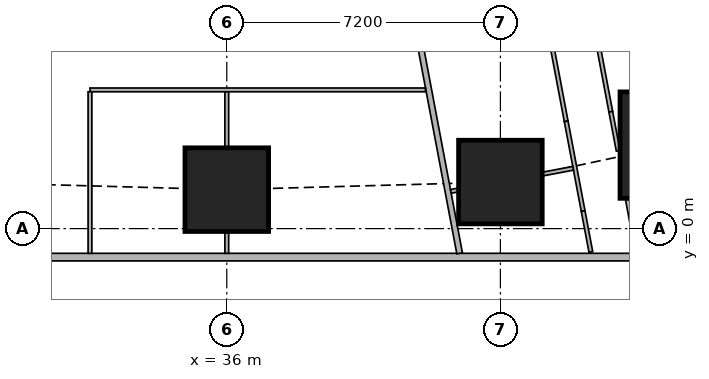
"""IFC4 building model, lengths in metres.
Left out: names, types, materials, properties, quantities, classifications, styles, units other than length and angle.
Written with IfcOpenShell. Run it as: python <this file> out.ifc"""

import sys

from ifc_helpers import new_model, si_unit, direction, frame, frame_2d, origin, origin_2d, place, context, subcontext, project, spatial, rectangle, extrude, element, fill, save


model = new_model("IFC4")
c1 = context("Model", 3, precision=1e-05, world=origin(), true_north=direction((0.0, 1.0)))
c2 = subcontext(c1, "Body", "Model", "MODEL_VIEW")
j1 = project(units=[si_unit("LENGTHUNIT", "METRE"), si_unit("PLANEANGLEUNIT", "RADIAN")], contexts=[c1])
p1 = place(None, origin())
s1 = spatial("IfcSite", under=j1, at=p1, CompositionType="ELEMENT")
p2 = place(p1, origin())
s2 = spatial("IfcBuilding", under=s1, at=p2, CompositionType="ELEMENT")
p3 = place(p2, frame((0.0, 0.0, 81.65)))
s3 = spatial("IfcBuildingStorey", under=s2, at=p3, CompositionType="ELEMENT", Elevation=81.65)
for number, where, z_axis, x_axis in (
    (1, (36.0, 1.025, 0.0), (0.0, 0.0, 1.0), (1.0, 0.0, 0.0)),
    (2, (43.2, 1.225, 0.0), (0.0, 0.0, 1.0), (1.0, 0.0, 0.0)),
):
    element("IfcColumn", number, at=place(p3, frame(where, z_axis=z_axis, x_axis=x_axis)), inside=s3, PredefinedType="COLUMN", context=c2, shape_type="SweptSolid", body=[
        extrude(rectangle(XDim=2.2, YDim=2.2, at=origin_2d()), origin(), (0.0, 0.0, 1.0), 3.75),
    ])
p4 = place(p3, frame((47.748, 2.197, 0.0), z_axis=(0.0, 0.0, 1.0), x_axis=(1.0, 0.0, 0.0)))
e3 = element("IfcColumn", 3, at=p4, inside=s3, PredefinedType="COLUMN", context=c2, shape_type="SweptSolid", body=[
    extrude(rectangle(XDim=2.8, YDim=2.8, at=origin_2d()), origin(), (0.0, 0.0, 1.0), 3.75),
])
p5 = place(p3, frame((2.163, -0.75, 0.0), z_axis=(0.0, 0.0, 1.0), x_axis=(1.0, 0.0, 0.0)))
e4 = element("IfcWall", 4, at=p5, inside=s3, PredefinedType="SOLIDWALL", context=c2, shape_type="SweptSolid", body=[
    extrude(rectangle(XDim=45.628, YDim=0.2, at=frame_2d((22.814, 0.0))), origin(), (0.0, 0.0, 1.0), 3.5),
])
p6 = place(p5, frame((9.537, 0.0, 0.9)))
e5 = element("IfcOpeningElement", 5, at=p6, cuts=e4, PredefinedType="OPENING", context=c2, shape_type="SweptSolid", body=[
    extrude(rectangle(XDim=1.8, YDim=1.5, at=frame_2d((0.9, 0.75))), frame((0.0, 0.11, 0.0), z_axis=(0.0, -1.0, 0.0), x_axis=(1.0, 0.0, 0.0)), (0.0, 0.0, 1.0), 0.22),
])
p7 = place(p5, frame((13.137, 0.0, 0.9)))
e6 = element("IfcOpeningElement", 6, at=p7, cuts=e4, PredefinedType="OPENING", context=c2, shape_type="SweptSolid", body=[
    extrude(rectangle(XDim=1.8, YDim=1.5, at=frame_2d((0.9, 0.75))), frame((0.0, 0.11, 0.0), z_axis=(0.0, -1.0, 0.0), x_axis=(1.0, 0.0, 0.0)), (0.0, 0.0, 1.0), 0.22),
])
p8 = place(p5, frame((16.737, 0.0, 0.9)))
e7 = element("IfcOpeningElement", 7, at=p8, cuts=e4, PredefinedType="OPENING", context=c2, shape_type="SweptSolid", body=[
    extrude(rectangle(XDim=1.8, YDim=1.5, at=frame_2d((0.9, 0.75))), frame((0.0, 0.11, 0.0), z_axis=(0.0, -1.0, 0.0), x_axis=(1.0, 0.0, 0.0)), (0.0, 0.0, 1.0), 0.22),
])
p9 = place(p5, frame((20.337, 0.0, 0.9)))
e8 = element("IfcOpeningElement", 8, at=p9, cuts=e4, PredefinedType="OPENING", context=c2, shape_type="SweptSolid", body=[
    extrude(rectangle(XDim=1.8, YDim=1.5, at=frame_2d((0.9, 0.75))), frame((0.0, 0.11, 0.0), z_axis=(0.0, -1.0, 0.0), x_axis=(1.0, 0.0, 0.0)), (0.0, 0.0, 1.0), 0.22),
])
p10 = place(p5, frame((23.937, 0.0, 0.9)))
e9 = element("IfcOpeningElement", 9, at=p10, cuts=e4, PredefinedType="OPENING", context=c2, shape_type="SweptSolid", body=[
    extrude(rectangle(XDim=1.8, YDim=1.5, at=frame_2d((0.9, 0.75))), frame((0.0, 0.11, 0.0), z_axis=(0.0, -1.0, 0.0), x_axis=(1.0, 0.0, 0.0)), (0.0, 0.0, 1.0), 0.22),
])
p11 = place(p5, frame((27.537, 0.0, 0.9)))
e10 = element("IfcOpeningElement", 10, at=p11, cuts=e4, PredefinedType="OPENING", context=c2, shape_type="SweptSolid", body=[
    extrude(rectangle(XDim=1.8, YDim=1.5, at=frame_2d((0.9, 0.75))), frame((0.0, 0.11, 0.0), z_axis=(0.0, -1.0, 0.0), x_axis=(1.0, 0.0, 0.0)), (0.0, 0.0, 1.0), 0.22),
])
p12 = place(p5, frame((31.137, 0.0, 0.9)))
e11 = element("IfcOpeningElement", 11, at=p12, cuts=e4, PredefinedType="OPENING", context=c2, shape_type="SweptSolid", body=[
    extrude(rectangle(XDim=1.8, YDim=1.5, at=frame_2d((0.9, 0.75))), frame((0.0, 0.11, 0.0), z_axis=(0.0, -1.0, 0.0), x_axis=(1.0, 0.0, 0.0)), (0.0, 0.0, 1.0), 0.22),
])
p13 = place(p5, frame((34.737, 0.0, 0.9)))
e12 = element("IfcOpeningElement", 12, at=p13, cuts=e4, PredefinedType="OPENING", context=c2, shape_type="SweptSolid", body=[
    extrude(rectangle(XDim=1.8, YDim=1.5, at=frame_2d((0.9, 0.75))), frame((0.0, 0.11, 0.0), z_axis=(0.0, -1.0, 0.0), x_axis=(1.0, 0.0, 0.0)), (0.0, 0.0, 1.0), 0.22),
])
p14 = place(p3, frame((50.653, 2.703, 0.0), z_axis=(0.0, 0.0, 1.0), x_axis=(-0.185612026696, 0.982623109613, 0.0)))
e13 = element("IfcWall", 13, at=p14, inside=s3, PredefinedType="SOLIDWALL", context=c2, shape_type="SweptSolid", body=[
    extrude(rectangle(XDim=41.393, YDim=0.2, at=frame_2d((20.697, 0.0))), origin(), (0.0, 0.0, 1.0), 3.5),
])
p15 = place(p14, frame((1.633, 0.0, 0.9)))
e14 = element("IfcOpeningElement", 14, at=p15, cuts=e13, PredefinedType="OPENING", context=c2, shape_type="SweptSolid", body=[
    extrude(rectangle(XDim=1.8, YDim=1.5, at=frame_2d((0.9, 0.75))), frame((0.0, 0.11, 0.0), z_axis=(0.0, -1.0, 0.0), x_axis=(1.0, 0.0, 0.0)), (0.0, 0.0, 1.0), 0.22),
])
p16 = place(p14, frame((6.032, 0.0, 0.9)))
e15 = element("IfcOpeningElement", 15, at=p16, cuts=e13, PredefinedType="OPENING", context=c2, shape_type="SweptSolid", body=[
    extrude(rectangle(XDim=1.8, YDim=1.5, at=frame_2d((0.9, 0.75))), frame((0.0, 0.11, 0.0), z_axis=(0.0, -1.0, 0.0), x_axis=(1.0, 0.0, 0.0)), (0.0, 0.0, 1.0), 0.22),
])
p17 = place(p14, frame((9.848, 0.0, 0.9)))
e16 = element("IfcOpeningElement", 16, at=p17, cuts=e13, PredefinedType="OPENING", context=c2, shape_type="SweptSolid", body=[
    extrude(rectangle(XDim=1.8, YDim=1.5, at=frame_2d((0.9, 0.75))), frame((0.0, 0.11, 0.0), z_axis=(0.0, -1.0, 0.0), x_axis=(1.0, 0.0, 0.0)), (0.0, 0.0, 1.0), 0.22),
])
p18 = place(p14, frame((13.664, 0.0, 0.9)))
e17 = element("IfcOpeningElement", 17, at=p18, cuts=e13, PredefinedType="OPENING", context=c2, shape_type="SweptSolid", body=[
    extrude(rectangle(XDim=1.8, YDim=1.5, at=frame_2d((0.9, 0.75))), frame((0.0, 0.11, 0.0), z_axis=(0.0, -1.0, 0.0), x_axis=(1.0, 0.0, 0.0)), (0.0, 0.0, 1.0), 0.22),
])
p19 = place(p14, frame((17.481, 0.0, 0.9)))
e18 = element("IfcOpeningElement", 18, at=p19, cuts=e13, PredefinedType="OPENING", context=c2, shape_type="SweptSolid", body=[
    extrude(rectangle(XDim=1.8, YDim=1.5, at=frame_2d((0.9, 0.75))), frame((0.0, 0.11, 0.0), z_axis=(0.0, -1.0, 0.0), x_axis=(1.0, 0.0, 0.0)), (0.0, 0.0, 1.0), 0.22),
])
p20 = place(p14, frame((21.297, 0.0, 0.9)))
e19 = element("IfcOpeningElement", 19, at=p20, cuts=e13, PredefinedType="OPENING", context=c2, shape_type="SweptSolid", body=[
    extrude(rectangle(XDim=1.8, YDim=1.5, at=frame_2d((0.9, 0.75))), frame((0.0, 0.11, 0.0), z_axis=(0.0, -1.0, 0.0), x_axis=(1.0, 0.0, 0.0)), (0.0, 0.0, 1.0), 0.22),
])
p21 = place(p14, frame((25.113, 0.0, 0.9)))
e20 = element("IfcOpeningElement", 20, at=p21, cuts=e13, PredefinedType="OPENING", context=c2, shape_type="SweptSolid", body=[
    extrude(rectangle(XDim=1.8, YDim=1.5, at=frame_2d((0.9, 0.75))), frame((0.0, 0.11, 0.0), z_axis=(0.0, -1.0, 0.0), x_axis=(1.0, 0.0, 0.0)), (0.0, 0.0, 1.0), 0.22),
])
p22 = place(p14, frame((28.93, 0.0, 0.9)))
e21 = element("IfcOpeningElement", 21, at=p22, cuts=e13, PredefinedType="OPENING", context=c2, shape_type="SweptSolid", body=[
    extrude(rectangle(XDim=1.8, YDim=1.5, at=frame_2d((0.9, 0.75))), frame((0.0, 0.11, 0.0), z_axis=(0.0, -1.0, 0.0), x_axis=(1.0, 0.0, 0.0)), (0.0, 0.0, 1.0), 0.22),
])
p23 = place(p14, frame((32.746, 0.0, 0.9)))
e22 = element("IfcOpeningElement", 22, at=p23, cuts=e13, PredefinedType="OPENING", context=c2, shape_type="SweptSolid", body=[
    extrude(rectangle(XDim=1.8, YDim=1.5, at=frame_2d((0.9, 0.75))), frame((0.0, 0.11, 0.0), z_axis=(0.0, -1.0, 0.0), x_axis=(1.0, 0.0, 0.0)), (0.0, 0.0, 1.0), 0.22),
])
p24 = place(p14, frame((36.481, 0.0, 0.9)))
e23 = element("IfcOpeningElement", 23, at=p24, cuts=e13, PredefinedType="OPENING", context=c2, shape_type="SweptSolid", body=[
    extrude(rectangle(XDim=1.8, YDim=1.5, at=frame_2d((0.9, 0.75))), frame((0.0, 0.11, 0.0), z_axis=(0.0, -1.0, 0.0), x_axis=(1.0, 0.0, 0.0)), (0.0, 0.0, 1.0), 0.22),
])
p25 = place(p3, frame((33.382, 45.65, 0.0), z_axis=(0.0, 0.0, 1.0), x_axis=(0.185593544777, -0.982626600565, 0.0)))
e24 = element("IfcWall", 24, at=p25, inside=s3, PredefinedType="SOLIDWALL", context=c2, shape_type="SweptSolid", body=[
    extrude(rectangle(XDim=47.118, YDim=0.15, at=frame_2d((23.559, 0.0))), origin(), (0.0, 0.0, 1.0), 2.2),
])
p26 = place(p25, frame((19.054, 0.0, 0.0)))
e25 = element("IfcOpeningElement", 25, at=p26, cuts=e24, PredefinedType="OPENING", context=c2, shape_type="SweptSolid", body=[
    extrude(rectangle(XDim=1.0, YDim=2.1, at=frame_2d((0.5, 1.05))), frame((0.0, 0.085, 0.0), z_axis=(0.0, -1.0, 0.0), x_axis=(1.0, 0.0, 0.0)), (0.0, 0.0, 1.0), 0.17),
])
p27 = place(p25, frame((22.87, 0.0, 0.0)))
e26 = element("IfcOpeningElement", 26, at=p27, cuts=e24, PredefinedType="OPENING", context=c2, shape_type="SweptSolid", body=[
    extrude(rectangle(XDim=1.0, YDim=2.1, at=frame_2d((0.5, 1.05))), frame((0.0, 0.085, 0.0), z_axis=(0.0, -1.0, 0.0), x_axis=(1.0, 0.0, 0.0)), (0.0, 0.0, 1.0), 0.17),
])
p28 = place(p25, frame((33.833, 0.0, 0.0)))
e27 = element("IfcOpeningElement", 27, at=p28, cuts=e24, PredefinedType="OPENING", context=c2, shape_type="SweptSolid", body=[
    extrude(rectangle(XDim=1.0, YDim=2.1, at=frame_2d((0.5, 1.05))), frame((0.0, 0.085, 0.0), z_axis=(0.0, -1.0, 0.0), x_axis=(1.0, 0.0, 0.0)), (0.0, 0.0, 1.0), 0.17),
])
p29 = place(p3, frame((41.229, 3.65, 0.0), z_axis=(0.0, 0.0, 1.0), x_axis=(-1.0, 0.0, 0.0)))
e28 = element("IfcWall", 28, at=p29, inside=s3, PredefinedType="PARTITIONING", context=c2, shape_type="SweptSolid", body=[
    extrude(rectangle(XDim=8.829, YDim=0.1, at=frame_2d((4.415, 0.0))), origin(), (0.0, 0.0, 1.0), 3.5),
])
p30 = place(p29, frame((7.729, 0.0, 0.0)))
e29 = element("IfcOpeningElement", 29, at=p30, cuts=e28, PredefinedType="OPENING", context=c2, shape_type="SweptSolid", body=[
    extrude(rectangle(XDim=0.9, YDim=2.1, at=frame_2d((0.45, 1.05))), frame((0.0, 0.06, 0.0), z_axis=(0.0, -1.0, 0.0), x_axis=(1.0, 0.0, 0.0)), (0.0, 0.0, 1.0), 0.12),
])
p31 = place(p29, frame((4.129, 0.0, 0.0)))
e30 = element("IfcOpeningElement", 30, at=p31, cuts=e28, PredefinedType="OPENING", context=c2, shape_type="SweptSolid", body=[
    extrude(rectangle(XDim=0.9, YDim=2.1, at=frame_2d((0.45, 1.05))), frame((0.0, 0.06, 0.0), z_axis=(0.0, -1.0, 0.0), x_axis=(1.0, 0.0, 0.0)), (0.0, 0.0, 1.0), 0.12),
])
p32 = place(p3, frame((32.4, -0.65, 0.0), z_axis=(0.0, 0.0, 1.0), x_axis=(0.0, 1.0, 0.0)))
e31 = element("IfcWall", 31, at=p32, inside=s3, PredefinedType="PARTITIONING", context=c2, shape_type="SweptSolid", body=[
    extrude(rectangle(XDim=4.25, YDim=0.1, at=frame_2d((2.125, 0.0))), origin(), (0.0, 0.0, 1.0), 2.2),
])
p33 = place(p3, frame((36.0, -0.65, 0.0), z_axis=(0.0, 0.0, 1.0), x_axis=(0.0, 1.0, 0.0)))
e32 = element("IfcWall", 32, at=p33, inside=s3, PredefinedType="PARTITIONING", context=c2, shape_type="SweptSolid", body=[
    extrude(rectangle(XDim=0.574, YDim=0.1, at=frame_2d((0.287, 0.0))), origin(), (0.0, 0.0, 1.0), 3.5),
])
p34 = place(p3, frame((36.0, 2.126, 0.0), z_axis=(0.0, 0.0, 1.0), x_axis=(0.0, 1.0, 0.0)))
e33 = element("IfcWall", 33, at=p34, inside=s3, PredefinedType="PARTITIONING", context=c2, shape_type="SweptSolid", body=[
    extrude(rectangle(XDim=1.474, YDim=0.1, at=frame_2d((0.737, 0.0))), origin(), (0.0, 0.0, 1.0), 3.5),
])
p35 = place(p3, frame((44.727, 10.366, 0.0), z_axis=(0.0, 0.0, 1.0), x_axis=(0.185678775129, -0.982610498858, 0.0)))
e34 = element("IfcWall", 34, at=p35, inside=s3, PredefinedType="PARTITIONING", context=c2, shape_type="SweptSolid", body=[
    extrude(rectangle(XDim=7.421, YDim=0.1, at=frame_2d((3.71, 0.0))), origin(), (0.0, 0.0, 1.0), 3.5),
])
p36 = place(p35, frame((0.151, 0.0, 0.0)))
e35 = element("IfcOpeningElement", 35, at=p36, cuts=e34, PredefinedType="OPENING", context=c2, shape_type="SweptSolid", body=[
    extrude(rectangle(XDim=0.9, YDim=2.1, at=frame_2d((0.45, 1.05))), frame((0.0, 0.06, 0.0), z_axis=(0.0, -1.0, 0.0), x_axis=(1.0, 0.0, 0.0)), (0.0, 0.0, 1.0), 0.12),
])
p37 = place(p35, frame((4.55, 0.0, 0.0)))
e36 = element("IfcOpeningElement", 36, at=p37, cuts=e34, PredefinedType="OPENING", context=c2, shape_type="SweptSolid", body=[
    extrude(rectangle(XDim=0.9, YDim=2.1, at=frame_2d((0.45, 1.05))), frame((0.0, 0.06, 0.0), z_axis=(0.0, -1.0, 0.0), x_axis=(1.0, 0.0, 0.0)), (0.0, 0.0, 1.0), 0.12),
])
p38 = place(p3, frame((46.105, 3.074, 0.0), z_axis=(0.0, 0.0, 1.0), x_axis=(0.185897769544, -0.982569091351, 0.0)))
e37 = element("IfcWall", 37, at=p38, inside=s3, PredefinedType="PARTITIONING", context=c2, shape_type="SweptSolid", body=[
    extrude(rectangle(XDim=1.044, YDim=0.1, at=frame_2d((0.522, 0.0))), origin(), (0.0, 0.0, 1.0), 2.05),
])
p39 = place(p3, frame((46.537, 0.787, 0.0), z_axis=(0.0, 0.0, 1.0), x_axis=(0.185348284603, -0.982672892368, 0.0)))
e38 = element("IfcWall", 38, at=p39, inside=s3, PredefinedType="PARTITIONING", context=c2, shape_type="SweptSolid", body=[
    extrude(rectangle(XDim=1.419, YDim=0.1, at=frame_2d((0.709, 0.0))), origin(), (0.0, 0.0, 1.0), 2.05),
])
p40 = place(p3, frame((44.049, 7.49, 0.0), z_axis=(0.0, 0.0, 1.0), x_axis=(0.185666332607, -0.982612849975, 0.0)))
e39 = element("IfcWall", 39, at=p40, inside=s3, PredefinedType="PARTITIONING", context=c2, shape_type="SweptSolid", body=[
    extrude(rectangle(XDim=4.75, YDim=0.1, at=frame_2d((2.375, 0.0))), origin(), (0.0, 0.0, 1.0), 3.5),
])
p41 = place(p40, frame((0.8, 0.0, 0.0)))
e40 = element("IfcOpeningElement", 40, at=p41, cuts=e39, PredefinedType="OPENING", context=c2, shape_type="SweptSolid", body=[
    extrude(rectangle(XDim=0.9, YDim=2.1, at=frame_2d((0.45, 1.05))), frame((0.0, 0.06, 0.0), z_axis=(0.0, -1.0, 0.0), x_axis=(1.0, 0.0, 0.0)), (0.0, 0.0, 1.0), 0.12),
])
p42 = place(p40, frame((2.396, 0.0, 0.0)))
e41 = element("IfcOpeningElement", 41, at=p42, cuts=e39, PredefinedType="OPENING", context=c2, shape_type="SweptSolid", body=[
    extrude(rectangle(XDim=0.9, YDim=2.1, at=frame_2d((0.45, 1.05))), frame((0.0, 0.06, 0.0), z_axis=(0.0, -1.0, 0.0), x_axis=(1.0, 0.0, 0.0)), (0.0, 0.0, 1.0), 0.12),
])
p43 = place(p3, frame((44.931, 2.823, 0.0), z_axis=(0.0, 0.0, 1.0), x_axis=(0.185631845838, -0.982619365681, 0.0)))
e42 = element("IfcWall", 42, at=p43, inside=s3, PredefinedType="PARTITIONING", context=c2, shape_type="SweptSolid", body=[
    extrude(rectangle(XDim=2.403, YDim=0.1, at=frame_2d((1.201, 0.0))), origin(), (0.0, 0.0, 1.0), 2.05),
])
p44 = place(p3, frame((45.377, 0.462, 0.0), z_axis=(0.0, 0.0, 1.0), x_axis=(0.185513480919, -0.982641719243, 0.0)))
e43 = element("IfcWall", 43, at=p44, inside=s3, PredefinedType="PARTITIONING", context=c2, shape_type="SweptSolid", body=[
    extrude(rectangle(XDim=1.095, YDim=0.1, at=frame_2d((0.547, 0.0))), origin(), (0.0, 0.0, 1.0), 3.5),
])
p45 = place(p3, frame((45.114, 1.587, 0.0), z_axis=(0.0, 0.0, 1.0), x_axis=(-0.982624706348, -0.185603573443, 0.0)))
e44 = element("IfcWall", 44, at=p45, inside=s3, PredefinedType="PARTITIONING", context=c2, shape_type="SweptSolid", body=[
    extrude(rectangle(XDim=0.818, YDim=0.1, at=frame_2d((0.409, 0.0))), origin(), (0.0, 0.0, 1.0), 2.05),
])
p46 = place(p3, frame((42.09, 1.016, 0.0), z_axis=(0.0, 0.0, 1.0), x_axis=(-0.982208563973, -0.187793335502, 0.0)))
e45 = element("IfcWall", 45, at=p46, inside=s3, PredefinedType="PARTITIONING", context=c2, shape_type="SweptSolid", body=[
    extrude(rectangle(XDim=0.198, YDim=0.1, at=frame_2d((0.099, 0.0))), origin(), (0.0, 0.0, 1.0), 2.05),
])
p47 = place(p11, origin())
e46 = element("IfcWindow", 46, at=p47, inside=s3, PartitioningType="SINGLE_PANEL", PredefinedType="WINDOW", context=c2, shape_type="SweptSolid", body=[
    extrude(rectangle(XDim=1.8, YDim=1.5, at=frame_2d((0.9, 0.75))), frame((0.0, 0.03, 0.0), z_axis=(0.0, -1.0, 0.0), x_axis=(1.0, 0.0, 0.0)), (0.0, 0.0, 1.0), 0.06),
])
fill(e10, e46)
p48 = place(p12, origin())
e47 = element("IfcWindow", 47, at=p48, inside=s3, PartitioningType="SINGLE_PANEL", PredefinedType="WINDOW", context=c2, shape_type="SweptSolid", body=[
    extrude(rectangle(XDim=1.8, YDim=1.5, at=frame_2d((0.9, 0.75))), frame((0.0, 0.03, 0.0), z_axis=(0.0, -1.0, 0.0), x_axis=(1.0, 0.0, 0.0)), (0.0, 0.0, 1.0), 0.06),
])
fill(e11, e47)
p49 = place(p13, origin())
e48 = element("IfcWindow", 48, at=p49, inside=s3, PartitioningType="SINGLE_PANEL", PredefinedType="WINDOW", context=c2, shape_type="SweptSolid", body=[
    extrude(rectangle(XDim=1.8, YDim=1.5, at=frame_2d((0.9, 0.75))), frame((0.0, 0.03, 0.0), z_axis=(0.0, -1.0, 0.0), x_axis=(1.0, 0.0, 0.0)), (0.0, 0.0, 1.0), 0.06),
])
fill(e12, e48)
p50 = place(p30, origin())
e49 = element("IfcDoor", 49, at=p50, inside=s3, OperationType="SINGLE_SWING_RIGHT", PredefinedType="DOOR", context=c2, shape_type="SweptSolid", body=[
    extrude(rectangle(XDim=0.9, YDim=2.1, at=frame_2d((0.45, 1.05))), frame((0.0, 0.025, 0.0), z_axis=(0.0, -1.0, 0.0), x_axis=(1.0, 0.0, 0.0)), (0.0, 0.0, 1.0), 0.05),
])
fill(e29, e49)
p51 = place(p31, origin())
e50 = element("IfcDoor", 50, at=p51, inside=s3, OperationType="SINGLE_SWING_RIGHT", PredefinedType="DOOR", context=c2, shape_type="SweptSolid", body=[
    extrude(rectangle(XDim=0.9, YDim=2.1, at=frame_2d((0.45, 1.05))), frame((0.0, 0.025, 0.0), z_axis=(0.0, -1.0, 0.0), x_axis=(1.0, 0.0, 0.0)), (0.0, 0.0, 1.0), 0.05),
])
fill(e30, e50)
p52 = place(p42, origin())
e51 = element("IfcDoor", 51, at=p52, inside=s3, OperationType="SINGLE_SWING_RIGHT", PredefinedType="DOOR", context=c2, shape_type="SweptSolid", body=[
    extrude(rectangle(XDim=0.9, YDim=2.1, at=frame_2d((0.45, 1.05))), frame((0.0, 0.025, 0.0), z_axis=(0.0, -1.0, 0.0), x_axis=(1.0, 0.0, 0.0)), (0.0, 0.0, 1.0), 0.05),
])
fill(e41, e51)
save(model, sys.argv[1])
